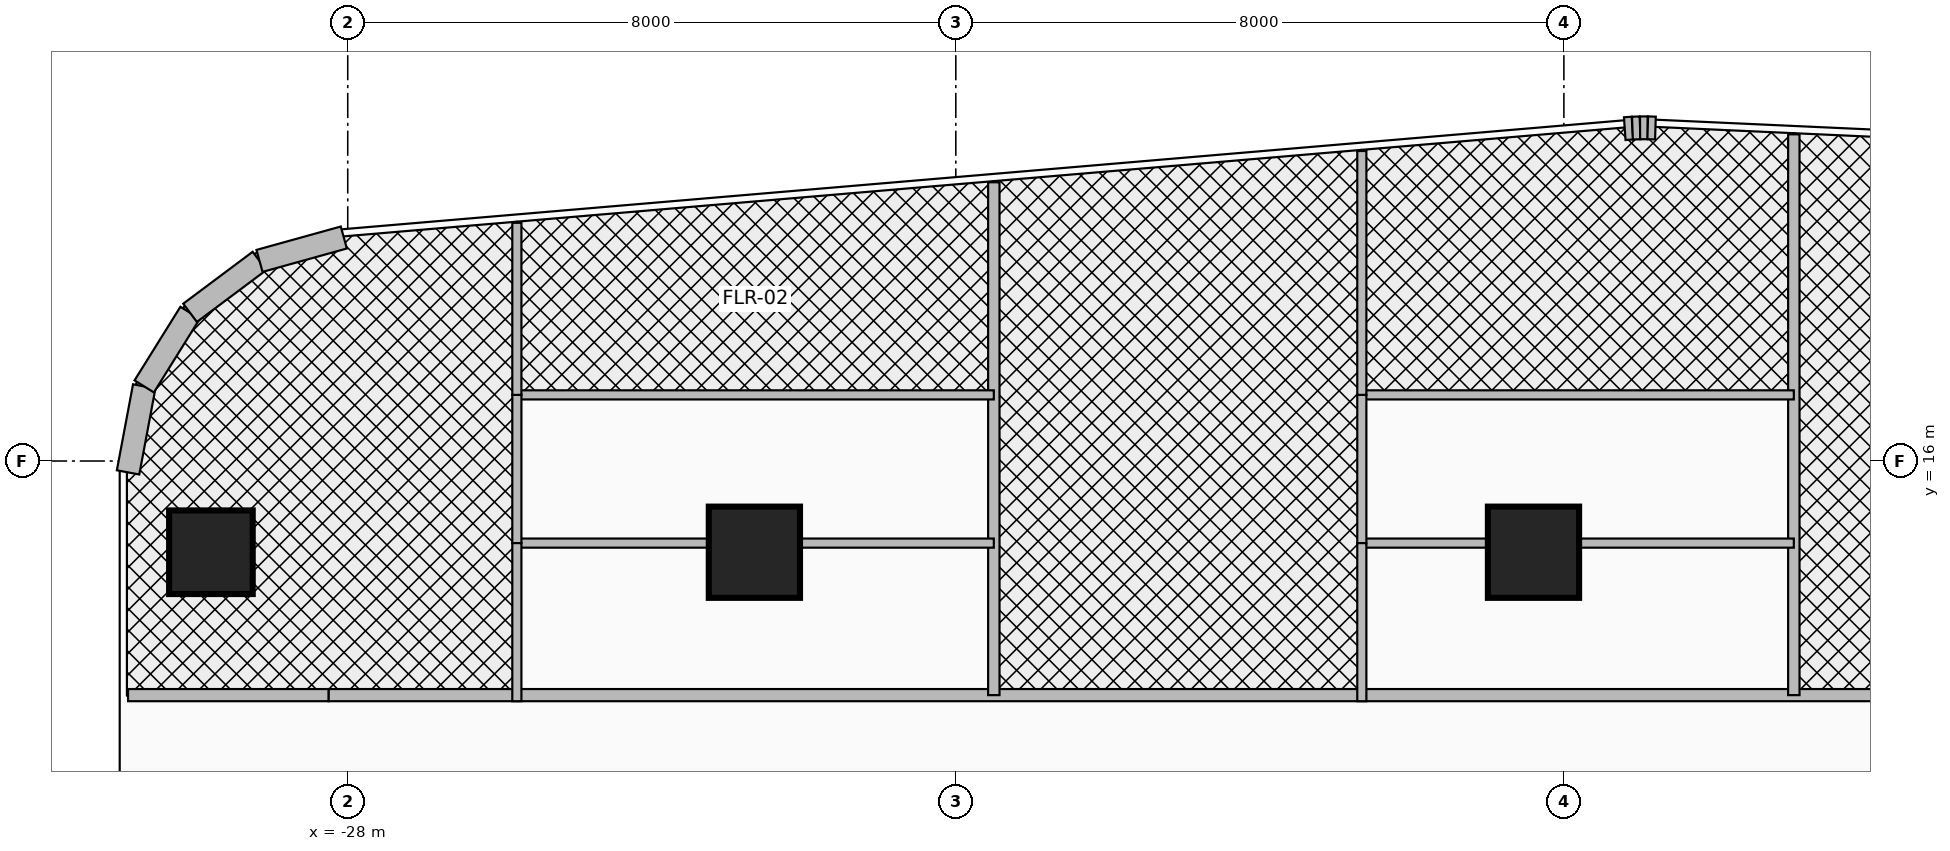
"""IFC4 building model, lengths in metres.
Left out: names, types, materials, properties, quantities, classifications, styles, units other than length and angle.
Written with IfcOpenShell. Run it as: python <this file> out.ifc"""

import sys

from ifc_helpers import new_model, si_unit, direction, frame, frame_2d, origin, origin_2d, place, context, subcontext, project, spatial, rectangle, circle, extrude, source, transform, mapped, element, fill, save


model = new_model("IFC4")
c1 = context("Model", 3, precision=1e-05, world=origin(), true_north=direction((0.0, 1.0)))
c2 = subcontext(c1, "Body", "Model", "MODEL_VIEW")
j1 = project(units=[si_unit("LENGTHUNIT", "METRE"), si_unit("PLANEANGLEUNIT", "RADIAN")], contexts=[c1])
p1 = place(None, origin())
s1 = spatial("IfcSite", under=j1, at=p1, CompositionType="ELEMENT")
p2 = place(p1, origin())
s2 = spatial("IfcBuilding", under=s1, at=p2, CompositionType="ELEMENT")
p3 = place(p2, frame((0.0, 0.0, 131.6)))
s3 = spatial("IfcBuildingStorey", under=s2, at=p3, CompositionType="ELEMENT", Elevation=131.6)
m1 = source(origin(), c2, "Body", "SweptSolid", [
    extrude(circle(Radius=0.55, at=origin_2d()), origin(), (0.0, 0.0, 1.0), 3.7),
])
p4 = place(p3, frame((-29.8, 14.8, 0.0), z_axis=(0.0, 0.0, 1.0), x_axis=(1.0, 0.0, 0.0)))
e1 = element("IfcColumn", 1, at=p4, inside=s3, PredefinedType="COLUMN", context=c2, shape_type="MappedRepresentation", body=[
    mapped(m1, transform((0.0, 0.0, 0.0), x_axis=(1.0, 0.0, 0.0), y_axis=(0.0, 1.0, 0.0), z_axis=(0.0, 0.0, 1.0), scale=1.0)),
])
m2 = source(origin(), c2, "Body", "SweptSolid", [
    extrude(rectangle(XDim=1.2, YDim=1.2, at=origin_2d()), origin(), (0.0, 0.0, 1.0), 3.7),
])
for number, where, z_axis, x_axis in (
    (2, (-22.65, 14.8, 0.0), (0.0, 0.0, 1.0), (1.0, 0.0, 0.0)),
    (3, (-12.4, 14.8, 0.0), (0.0, 0.0, 1.0), (1.0, 0.0, 0.0)),
):
    element("IfcColumn", number, at=place(p3, frame(where, z_axis=z_axis, x_axis=x_axis)), inside=s3, PredefinedType="COLUMN", context=c2, shape_type="MappedRepresentation", body=[
        mapped(m2, transform((0.0, 0.0, 0.0), x_axis=(1.0, 0.0, 0.0), y_axis=(0.0, 1.0, 0.0), z_axis=(0.0, 0.0, 1.0), scale=1.0)),
    ])
p5 = place(p3, frame((-30.89, 15.85, 0.0), z_axis=(0.0, 0.0, 1.0), x_axis=(0.184557499391, 0.982821718023, 0.0)))
e4 = element("IfcWall", 4, at=p5, inside=s3, PredefinedType="SOLIDWALL", context=c2, shape_type="SweptSolid", body=[
    extrude(rectangle(XDim=1.151, YDim=0.3, at=frame_2d((0.575, 0.0))), origin(), (0.0, 0.0, 1.0), 3.46),
])
p6 = place(p3, frame((-30.677, 16.981, 0.0), z_axis=(0.0, 0.0, 1.0), x_axis=(0.52880576008, 0.848742875143, 0.0)))
e5 = element("IfcWall", 5, at=p6, inside=s3, PredefinedType="SOLIDWALL", context=c2, shape_type="SweptSolid", body=[
    extrude(rectangle(XDim=1.141, YDim=0.3, at=frame_2d((0.57, 0.0))), origin(), (0.0, 0.0, 1.0), 3.46),
])
p7 = place(p3, frame((-30.074, 17.95, 0.0), z_axis=(0.0, 0.0, 1.0), x_axis=(0.800975009324, 0.598697782223, 0.0)))
e6 = element("IfcWall", 6, at=p7, inside=s3, PredefinedType="SOLIDWALL", context=c2, shape_type="SweptSolid", body=[
    extrude(rectangle(XDim=1.141, YDim=0.3, at=frame_2d((0.57, 0.0))), origin(), (0.0, 0.0, 1.0), 3.46),
])
p8 = place(p3, frame((-29.161, 18.633, 0.0), z_axis=(0.0, 0.0, 1.0), x_axis=(0.963624193367, 0.267260947313, 0.0)))
e7 = element("IfcWall", 7, at=p8, inside=s3, PredefinedType="SOLIDWALL", context=c2, shape_type="SweptSolid", body=[
    extrude(rectangle(XDim=1.151, YDim=0.3, at=frame_2d((0.575, 0.0))), origin(), (0.0, 0.0, 1.0), 3.46),
])
p9 = place(p3, frame((-11.199, 20.373, 0.0), z_axis=(0.0, 0.0, 1.0), x_axis=(0.997567332166, 0.069709524416, 0.0)))
e8 = element("IfcWall", 8, at=p9, inside=s3, PredefinedType="SOLIDWALL", context=c2, shape_type="SweptSolid", body=[
    extrude(rectangle(XDim=0.102, YDim=0.3, at=frame_2d((0.051, 0.0))), origin(), (0.0, 0.0, 1.0), 3.46),
])
p10 = place(p3, frame((-11.098, 20.38, 0.0), z_axis=(0.0, 0.0, 1.0), x_axis=(0.999334672785, 0.03647206835, 0.0)))
e9 = element("IfcWall", 9, at=p10, inside=s3, PredefinedType="SOLIDWALL", context=c2, shape_type="SweptSolid", body=[
    extrude(rectangle(XDim=0.1, YDim=0.3, at=frame_2d((0.05, 0.0))), origin(), (0.0, 0.0, 1.0), 3.46),
])
p11 = place(p3, frame((-10.998, 20.383, 0.0), z_axis=(0.0, 0.0, 1.0), x_axis=(0.999997054401, 0.002427177317, 0.0)))
e10 = element("IfcWall", 10, at=p11, inside=s3, PredefinedType="SOLIDWALL", context=c2, shape_type="SweptSolid", body=[
    extrude(rectangle(XDim=0.101, YDim=0.3, at=frame_2d((0.05, 0.0))), origin(), (0.0, 0.0, 1.0), 3.46),
])
p12 = place(p3, frame((-10.897, 20.384, 0.0), z_axis=(0.0, 0.0, 1.0), x_axis=(0.999584209171, -0.02883415988, 0.0)))
e11 = element("IfcWall", 11, at=p12, inside=s3, PredefinedType="SOLIDWALL", context=c2, shape_type="SweptSolid", body=[
    extrude(rectangle(XDim=0.102, YDim=0.3, at=frame_2d((0.051, 0.0))), origin(), (0.0, 0.0, 1.0), 3.46),
])
p13 = place(p3, frame((-30.89, 12.92, 0.0), z_axis=(0.0, 0.0, 1.0), x_axis=(1.0, 0.0, 0.0)))
e12 = element("IfcWall", 12, at=p13, inside=s3, PredefinedType="PARTITIONING", context=c2, shape_type="SweptSolid", body=[
    extrude(rectangle(XDim=2.64, YDim=0.16, at=frame_2d((1.32, 0.0))), origin(), (0.0, 0.0, 1.0), 2.896),
])
p14 = place(p3, frame((-28.25, 12.92, 0.0), z_axis=(0.0, 0.0, 1.0), x_axis=(1.0, 0.0, 0.0)))
e13 = element("IfcWall", 13, at=p14, inside=s3, PredefinedType="PARTITIONING", context=c2, shape_type="SweptSolid", body=[
    extrude(rectangle(XDim=41.8, YDim=0.16, at=frame_2d((20.9, 0.0))), origin(), (0.0, 0.0, 1.0), 2.666),
])
p15 = place(p14, frame((0.763, 0.0, 0.0)))
e14 = element("IfcOpeningElement", 14, at=p15, cuts=e13, PredefinedType="OPENING", context=c2, shape_type="SweptSolid", body=[
    extrude(rectangle(XDim=0.95, YDim=2.15, at=frame_2d((0.475, 1.075))), frame((0.0, 0.095, 0.0), z_axis=(0.0, -1.0, 0.0), x_axis=(1.0, 0.0, 0.0)), (0.0, 0.0, 1.0), 0.19),
])
p16 = place(p14, frame((10.696, 0.0, 0.0)))
e15 = element("IfcOpeningElement", 15, at=p16, cuts=e13, PredefinedType="OPENING", context=c2, shape_type="SweptSolid", body=[
    extrude(rectangle(XDim=0.95, YDim=2.15, at=frame_2d((0.475, 1.075))), frame((0.0, 0.095, 0.0), z_axis=(0.0, -1.0, 0.0), x_axis=(1.0, 0.0, 0.0)), (0.0, 0.0, 1.0), 0.19),
])
p17 = place(p14, frame((22.215, 0.0, 0.0)))
e16 = element("IfcOpeningElement", 16, at=p17, cuts=e13, PredefinedType="OPENING", context=c2, shape_type="SweptSolid", body=[
    extrude(rectangle(XDim=0.95, YDim=2.15, at=frame_2d((0.475, 1.075))), frame((0.0, 0.095, 0.0), z_axis=(0.0, -1.0, 0.0), x_axis=(1.0, 0.0, 0.0)), (0.0, 0.0, 1.0), 0.19),
])
p18 = place(p14, frame((32.652, 0.0, 0.0)))
e17 = element("IfcOpeningElement", 17, at=p18, cuts=e13, PredefinedType="OPENING", context=c2, shape_type="SweptSolid", body=[
    extrude(rectangle(XDim=0.95, YDim=2.15, at=frame_2d((0.475, 1.075))), frame((0.0, 0.095, 0.0), z_axis=(0.0, -1.0, 0.0), x_axis=(1.0, 0.0, 0.0)), (0.0, 0.0, 1.0), 0.19),
])
p19 = place(p3, frame((-19.5, 12.92, 0.0), z_axis=(0.0, 0.0, 1.0), x_axis=(0.0, 1.0, 0.0)))
e18 = element("IfcWall", 18, at=p19, inside=s3, PredefinedType="PARTITIONING", context=c2, shape_type="SweptSolid", body=[
    extrude(rectangle(XDim=6.747, YDim=0.15, at=frame_2d((3.374, 0.0))), origin(), (0.0, 0.0, 1.0), 2.666),
])
p20 = place(p3, frame((-8.975, 12.92, 0.0), z_axis=(0.0, 0.0, 1.0), x_axis=(0.0, 1.0, 0.0)))
e19 = element("IfcWall", 19, at=p20, inside=s3, PredefinedType="PARTITIONING", context=c2, shape_type="SweptSolid", body=[
    extrude(rectangle(XDim=7.378, YDim=0.15, at=frame_2d((3.689, 0.0))), origin(), (0.0, 0.0, 1.0), 2.666),
])
p21 = place(p3, frame((-25.775, 14.92, 0.0), z_axis=(0.0, 0.0, 1.0), x_axis=(1.0, 0.0, 0.0)))
e20 = element("IfcWall", 20, at=p21, inside=s3, PredefinedType="PARTITIONING", context=c2, shape_type="SweptSolid", body=[
    extrude(rectangle(XDim=6.275, YDim=0.12, at=frame_2d((3.137, 0.0))), origin(), (0.0, 0.0, 1.0), 2.666),
])
p22 = place(p3, frame((-25.775, 16.87, 0.0), z_axis=(0.0, 0.0, 1.0), x_axis=(1.0, 0.0, 0.0)))
e21 = element("IfcWall", 21, at=p22, inside=s3, PredefinedType="PARTITIONING", context=c2, shape_type="SweptSolid", body=[
    extrude(rectangle(XDim=6.275, YDim=0.12, at=frame_2d((3.137, 0.0))), origin(), (0.0, 0.0, 1.0), 3.46),
])
p23 = place(p3, frame((-25.775, 14.92, 0.0), z_axis=(0.0, 0.0, 1.0), x_axis=(0.0, 1.0, 0.0)))
e22 = element("IfcWall", 22, at=p23, inside=s3, PredefinedType="PARTITIONING", context=c2, shape_type="SweptSolid", body=[
    extrude(rectangle(XDim=1.95, YDim=0.12, at=frame_2d((0.975, 0.0))), origin(), (0.0, 0.0, 1.0), 2.666),
])
p24 = place(p23, frame((0.55, 0.0, 0.0)))
e23 = element("IfcOpeningElement", 23, at=p24, cuts=e22, PredefinedType="OPENING", context=c2, shape_type="SweptSolid", body=[
    extrude(rectangle(XDim=0.85, YDim=2.1, at=frame_2d((0.425, 1.05))), frame((0.0, 0.075, 0.0), z_axis=(0.0, -1.0, 0.0), x_axis=(1.0, 0.0, 0.0)), (0.0, 0.0, 1.0), 0.15),
])
p25 = place(p3, frame((-25.775, 12.84, 0.0), z_axis=(0.0, 0.0, 1.0), x_axis=(0.0, 1.0, 0.0)))
e24 = element("IfcWall", 24, at=p25, inside=s3, PredefinedType="PARTITIONING", context=c2, shape_type="SweptSolid", body=[
    extrude(rectangle(XDim=2.08, YDim=0.12, at=frame_2d((1.04, 0.0))), origin(), (0.0, 0.0, 1.0), 2.666),
])
p26 = place(p25, frame((0.55, 0.0, 0.0)))
e25 = element("IfcOpeningElement", 25, at=p26, cuts=e24, PredefinedType="OPENING", context=c2, shape_type="SweptSolid", body=[
    extrude(rectangle(XDim=0.9, YDim=2.1, at=frame_2d((0.45, 1.05))), frame((0.0, 0.075, 0.0), z_axis=(0.0, -1.0, 0.0), x_axis=(1.0, 0.0, 0.0)), (0.0, 0.0, 1.0), 0.15),
])
p27 = place(p3, frame((-25.775, 16.87, 0.0), z_axis=(0.0, 0.0, 1.0), x_axis=(0.0, 1.0, 0.0)))
e26 = element("IfcWall", 26, at=p27, inside=s3, PredefinedType="PARTITIONING", context=c2, shape_type="SweptSolid", body=[
    extrude(rectangle(XDim=2.264, YDim=0.12, at=frame_2d((1.132, 0.0))), origin(), (0.0, 0.0, 1.0), 3.46),
])
p28 = place(p27, frame((0.682, 0.0, 0.0)))
e27 = element("IfcOpeningElement", 27, at=p28, cuts=e26, PredefinedType="OPENING", context=c2, shape_type="SweptSolid", body=[
    extrude(rectangle(XDim=0.9, YDim=2.1, at=frame_2d((0.45, 1.05))), frame((0.0, 0.075, 0.0), z_axis=(0.0, -1.0, 0.0), x_axis=(1.0, 0.0, 0.0)), (0.0, 0.0, 1.0), 0.15),
])
p29 = place(p3, frame((-14.658, 14.92, 0.0), z_axis=(0.0, 0.0, 1.0), x_axis=(1.0, 0.0, 0.0)))
e28 = element("IfcWall", 28, at=p29, inside=s3, PredefinedType="PARTITIONING", context=c2, shape_type="SweptSolid", body=[
    extrude(rectangle(XDim=5.683, YDim=0.12, at=frame_2d((2.842, 0.0))), origin(), (0.0, 0.0, 1.0), 2.666),
])
p30 = place(p3, frame((-14.658, 16.87, 0.0), z_axis=(0.0, 0.0, 1.0), x_axis=(1.0, 0.0, 0.0)))
e29 = element("IfcWall", 29, at=p30, inside=s3, PredefinedType="PARTITIONING", context=c2, shape_type="SweptSolid", body=[
    extrude(rectangle(XDim=5.683, YDim=0.12, at=frame_2d((2.842, 0.0))), origin(), (0.0, 0.0, 1.0), 3.46),
])
p31 = place(p3, frame((-14.658, 14.92, 0.0), z_axis=(0.0, 0.0, 1.0), x_axis=(0.0, 1.0, 0.0)))
e30 = element("IfcWall", 30, at=p31, inside=s3, PredefinedType="PARTITIONING", context=c2, shape_type="SweptSolid", body=[
    extrude(rectangle(XDim=1.95, YDim=0.12, at=frame_2d((0.975, 0.0))), origin(), (0.0, 0.0, 1.0), 2.666),
])
p32 = place(p31, frame((0.55, 0.0, 0.0)))
e31 = element("IfcOpeningElement", 31, at=p32, cuts=e30, PredefinedType="OPENING", context=c2, shape_type="SweptSolid", body=[
    extrude(rectangle(XDim=0.85, YDim=2.1, at=frame_2d((0.425, 1.05))), frame((0.0, 0.075, 0.0), z_axis=(0.0, -1.0, 0.0), x_axis=(1.0, 0.0, 0.0)), (0.0, 0.0, 1.0), 0.15),
])
p33 = place(p3, frame((-14.658, 12.84, 0.0), z_axis=(0.0, 0.0, 1.0), x_axis=(0.0, 1.0, 0.0)))
e32 = element("IfcWall", 32, at=p33, inside=s3, PredefinedType="PARTITIONING", context=c2, shape_type="SweptSolid", body=[
    extrude(rectangle(XDim=2.08, YDim=0.12, at=frame_2d((1.04, 0.0))), origin(), (0.0, 0.0, 1.0), 2.666),
])
p34 = place(p33, frame((0.55, 0.0, 0.0)))
e33 = element("IfcOpeningElement", 33, at=p34, cuts=e32, PredefinedType="OPENING", context=c2, shape_type="SweptSolid", body=[
    extrude(rectangle(XDim=0.9, YDim=2.1, at=frame_2d((0.45, 1.05))), frame((0.0, 0.075, 0.0), z_axis=(0.0, -1.0, 0.0), x_axis=(1.0, 0.0, 0.0)), (0.0, 0.0, 1.0), 0.15),
])
p35 = place(p3, frame((-14.658, 16.87, 0.0), z_axis=(0.0, 0.0, 1.0), x_axis=(0.0, 1.0, 0.0)))
e34 = element("IfcWall", 34, at=p35, inside=s3, PredefinedType="PARTITIONING", context=c2, shape_type="SweptSolid", body=[
    extrude(rectangle(XDim=3.208, YDim=0.12, at=frame_2d((1.604, 0.0))), origin(), (0.0, 0.0, 1.0), 3.46),
])
p36 = place(p35, frame((1.154, 0.0, 0.0)))
e35 = element("IfcOpeningElement", 35, at=p36, cuts=e34, PredefinedType="OPENING", context=c2, shape_type="SweptSolid", body=[
    extrude(rectangle(XDim=0.9, YDim=2.1, at=frame_2d((0.45, 1.05))), frame((0.0, 0.075, 0.0), z_axis=(0.0, -1.0, 0.0), x_axis=(1.0, 0.0, 0.0)), (0.0, 0.0, 1.0), 0.15),
])
p37 = place(p15, origin())
e36 = element("IfcDoor", 36, at=p37, inside=s3, OperationType="SINGLE_SWING_RIGHT", PredefinedType="DOOR", context=c2, shape_type="SweptSolid", body=[
    extrude(rectangle(XDim=0.95, YDim=2.15, at=frame_2d((0.475, 1.075))), frame((0.0, 0.025, 0.0), z_axis=(0.0, -1.0, 0.0), x_axis=(1.0, 0.0, 0.0)), (0.0, 0.0, 1.0), 0.05),
])
fill(e14, e36)
p38 = place(p24, origin())
e37 = element("IfcDoor", 37, at=p38, inside=s3, OperationType="SINGLE_SWING_LEFT", PredefinedType="DOOR", context=c2, shape_type="SweptSolid", body=[
    extrude(rectangle(XDim=0.85, YDim=2.1, at=frame_2d((0.425, 1.05))), frame((0.0, 0.025, 0.0), z_axis=(0.0, -1.0, 0.0), x_axis=(1.0, 0.0, 0.0)), (0.0, 0.0, 1.0), 0.05),
])
fill(e23, e37)
p39 = place(p26, origin())
e38 = element("IfcDoor", 38, at=p39, inside=s3, OperationType="SINGLE_SWING_RIGHT", PredefinedType="DOOR", context=c2, shape_type="SweptSolid", body=[
    extrude(rectangle(XDim=0.9, YDim=2.1, at=frame_2d((0.45, 1.05))), frame((0.0, 0.025, 0.0), z_axis=(0.0, -1.0, 0.0), x_axis=(1.0, 0.0, 0.0)), (0.0, 0.0, 1.0), 0.05),
])
fill(e25, e38)
p40 = place(p28, frame((0.9, 0.0, 0.0), z_axis=(0.0, 0.0, 1.0), x_axis=(-1.0, 0.0, 0.0)))
e39 = element("IfcDoor", 39, at=p40, inside=s3, OperationType="SINGLE_SWING_LEFT", PredefinedType="DOOR", context=c2, shape_type="SweptSolid", body=[
    extrude(rectangle(XDim=0.9, YDim=2.1, at=frame_2d((0.45, 1.05))), frame((0.0, 0.025, 0.0), z_axis=(0.0, -1.0, 0.0), x_axis=(1.0, 0.0, 0.0)), (0.0, 0.0, 1.0), 0.05),
])
fill(e27, e39)
p41 = place(p16, origin())
e40 = element("IfcDoor", 40, at=p41, inside=s3, OperationType="SINGLE_SWING_RIGHT", PredefinedType="DOOR", context=c2, shape_type="SweptSolid", body=[
    extrude(rectangle(XDim=0.95, YDim=2.15, at=frame_2d((0.475, 1.075))), frame((0.0, 0.025, 0.0), z_axis=(0.0, -1.0, 0.0), x_axis=(1.0, 0.0, 0.0)), (0.0, 0.0, 1.0), 0.05),
])
fill(e15, e40)
p42 = place(p32, origin())
e41 = element("IfcDoor", 41, at=p42, inside=s3, OperationType="SINGLE_SWING_LEFT", PredefinedType="DOOR", context=c2, shape_type="SweptSolid", body=[
    extrude(rectangle(XDim=0.85, YDim=2.1, at=frame_2d((0.425, 1.05))), frame((0.0, 0.025, 0.0), z_axis=(0.0, -1.0, 0.0), x_axis=(1.0, 0.0, 0.0)), (0.0, 0.0, 1.0), 0.05),
])
fill(e31, e41)
p43 = place(p34, origin())
e42 = element("IfcDoor", 42, at=p43, inside=s3, OperationType="SINGLE_SWING_RIGHT", PredefinedType="DOOR", context=c2, shape_type="SweptSolid", body=[
    extrude(rectangle(XDim=0.9, YDim=2.1, at=frame_2d((0.45, 1.05))), frame((0.0, 0.025, 0.0), z_axis=(0.0, -1.0, 0.0), x_axis=(1.0, 0.0, 0.0)), (0.0, 0.0, 1.0), 0.05),
])
fill(e33, e42)
p44 = place(p36, frame((0.9, 0.0, 0.0), z_axis=(0.0, 0.0, 1.0), x_axis=(-1.0, 0.0, 0.0)))
e43 = element("IfcDoor", 43, at=p44, inside=s3, OperationType="SINGLE_SWING_LEFT", PredefinedType="DOOR", context=c2, shape_type="SweptSolid", body=[
    extrude(rectangle(XDim=0.9, YDim=2.1, at=frame_2d((0.45, 1.05))), frame((0.0, 0.025, 0.0), z_axis=(0.0, -1.0, 0.0), x_axis=(1.0, 0.0, 0.0)), (0.0, 0.0, 1.0), 0.05),
])
fill(e35, e43)
save(model, sys.argv[1])
